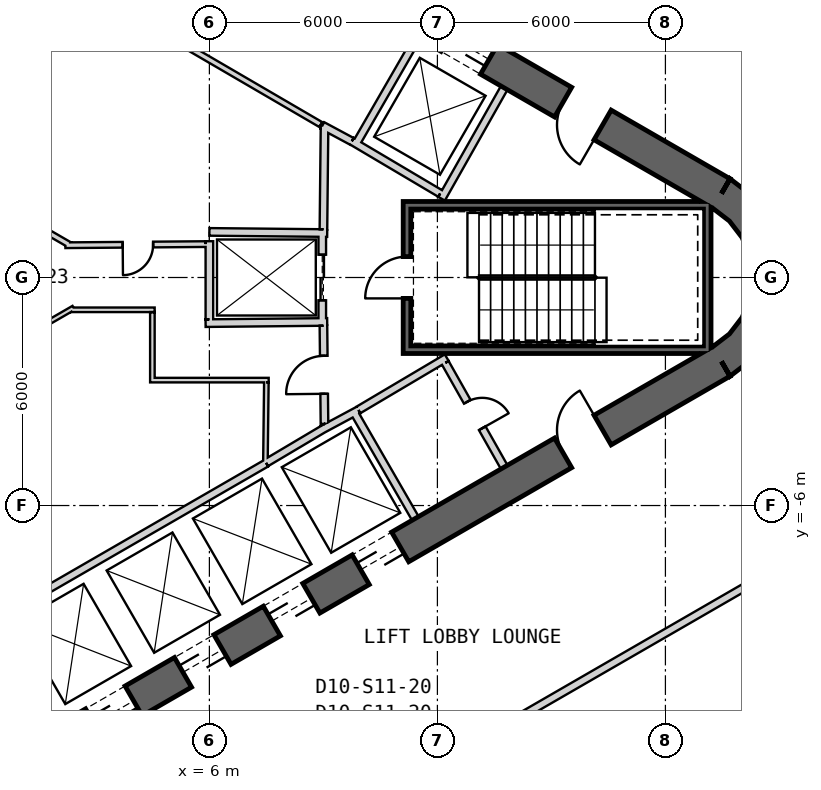
"""IFC4 building model, lengths in metres.
Left out: names, types, materials, properties, quantities, classifications, styles, units other than length and angle.
Written with IfcOpenShell. Run it as: python <this file> out.ifc"""

import sys

from ifc_helpers import new_model, si_unit, direction, frame, frame_2d, origin, place, context, subcontext, project, spatial, polyline, rectangle, outline, extrude, element, fill, save


model = new_model("IFC4")
c1 = context("Model", 3, precision=1e-05, world=origin(), true_north=direction((0.0, 1.0)))
c2 = subcontext(c1, "Body", "Model", "MODEL_VIEW")
j1 = project(units=[si_unit("LENGTHUNIT", "METRE"), si_unit("PLANEANGLEUNIT", "RADIAN")], contexts=[c1])
p1 = place(None, origin())
s1 = spatial("IfcSite", under=j1, at=p1, CompositionType="ELEMENT")
p2 = place(p1, origin())
s2 = spatial("IfcBuilding", under=s1, at=p2, CompositionType="ELEMENT")
p3 = place(p2, frame((0.0, 0.0, 193.2)))
s3 = spatial("IfcBuildingStorey", under=s2, at=p3, CompositionType="ELEMENT", Elevation=193.2)
p4 = place(p3, frame((19.475, 2.208, 0.0), z_axis=(0.0, 0.0, 1.0), x_axis=(-0.866028369851, 0.499994862586, 0.0)))
e1 = element("IfcWall", 1, at=p4, inside=s3, PredefinedType="SHEAR", context=c2, shape_type="SweptSolid", body=[
    extrude(rectangle(XDim=31.523, YDim=0.9, at=frame_2d((15.762, 0.0))), origin(), (0.0, 0.0, 1.0), 4.0),
])
p5 = place(p4, frame((7.062, 0.0, 0.0)))
e2 = element("IfcOpeningElement", 2, at=p5, cuts=e1, PredefinedType="OPENING", context=c2, shape_type="SweptSolid", body=[
    extrude(rectangle(XDim=1.2, YDim=2.4, at=frame_2d((0.6, 1.2))), frame((0.0, 0.46, 0.0), z_axis=(0.0, -1.0, 0.0), x_axis=(1.0, 0.0, 0.0)), (0.0, 0.0, 1.0), 0.92),
])
p6 = place(p4, frame((3.612, 0.0, 0.0)))
e3 = element("IfcOpeningElement", 3, at=p6, cuts=e1, PredefinedType="OPENING", context=c2, shape_type="SweptSolid", body=[
    extrude(rectangle(XDim=1.2, YDim=2.4, at=frame_2d((0.6, 1.2))), frame((0.0, 0.46, 0.0), z_axis=(0.0, -1.0, 0.0), x_axis=(1.0, 0.0, 0.0)), (0.0, 0.0, 1.0), 0.92),
])
p7 = place(p4, frame((26.712, 0.0, 0.0)))
e4 = element("IfcOpeningElement", 4, at=p7, cuts=e1, PredefinedType="OPENING", context=c2, shape_type="SweptSolid", body=[
    extrude(rectangle(XDim=1.2, YDim=2.4, at=frame_2d((0.6, 1.2))), frame((0.0, 0.46, 0.0), z_axis=(0.0, -1.0, 0.0), x_axis=(1.0, 0.0, 0.0)), (0.0, 0.0, 1.0), 0.92),
])
p8 = place(p3, frame((-7.825, -17.97, 0.0), z_axis=(0.0, 0.0, 1.0), x_axis=(0.866028369851, 0.499994862586, 0.0)))
e5 = element("IfcWall", 5, at=p8, inside=s3, PredefinedType="SHEAR", context=c2, shape_type="SweptSolid", body=[
    extrude(rectangle(XDim=31.523, YDim=0.9, at=frame_2d((15.762, 0.0))), origin(), (0.0, 0.0, 1.0), 4.0),
])
p9 = place(p8, frame((7.062, 0.0, 0.0)))
e6 = element("IfcOpeningElement", 6, at=p9, cuts=e5, PredefinedType="OPENING", context=c2, shape_type="SweptSolid", body=[
    extrude(rectangle(XDim=1.2, YDim=2.4, at=frame_2d((0.6, 1.2))), frame((0.0, 0.46, 0.0), z_axis=(0.0, -1.0, 0.0), x_axis=(1.0, 0.0, 0.0)), (0.0, 0.0, 1.0), 0.92),
])
p10 = place(p8, frame((9.762, 0.0, 0.0)))
e7 = element("IfcOpeningElement", 7, at=p10, cuts=e5, PredefinedType="OPENING", context=c2, shape_type="SweptSolid", body=[
    extrude(rectangle(XDim=1.2, YDim=2.4, at=frame_2d((0.6, 1.2))), frame((0.0, 0.46, 0.0), z_axis=(0.0, -1.0, 0.0), x_axis=(1.0, 0.0, 0.0)), (0.0, 0.0, 1.0), 0.92),
])
p11 = place(p8, frame((12.462, 0.0, 0.0)))
e8 = element("IfcOpeningElement", 8, at=p11, cuts=e5, PredefinedType="OPENING", context=c2, shape_type="SweptSolid", body=[
    extrude(rectangle(XDim=1.2, YDim=2.4, at=frame_2d((0.6, 1.2))), frame((0.0, 0.46, 0.0), z_axis=(0.0, -1.0, 0.0), x_axis=(1.0, 0.0, 0.0)), (0.0, 0.0, 1.0), 0.92),
])
p12 = place(p8, frame((15.162, 0.0, 0.0)))
e9 = element("IfcOpeningElement", 9, at=p12, cuts=e5, PredefinedType="OPENING", context=c2, shape_type="SweptSolid", body=[
    extrude(rectangle(XDim=1.2, YDim=2.4, at=frame_2d((0.6, 1.2))), frame((0.0, 0.46, 0.0), z_axis=(0.0, -1.0, 0.0), x_axis=(1.0, 0.0, 0.0)), (0.0, 0.0, 1.0), 0.92),
])
p13 = place(p8, frame((17.862, 0.0, 0.0)))
e10 = element("IfcOpeningElement", 10, at=p13, cuts=e5, PredefinedType="OPENING", context=c2, shape_type="SweptSolid", body=[
    extrude(rectangle(XDim=1.2, YDim=2.4, at=frame_2d((0.6, 1.2))), frame((0.0, 0.46, 0.0), z_axis=(0.0, -1.0, 0.0), x_axis=(1.0, 0.0, 0.0)), (0.0, 0.0, 1.0), 0.92),
])
p14 = place(p8, frame((20.562, 0.0, 0.0)))
e11 = element("IfcOpeningElement", 11, at=p14, cuts=e5, PredefinedType="OPENING", context=c2, shape_type="SweptSolid", body=[
    extrude(rectangle(XDim=1.2, YDim=2.4, at=frame_2d((0.6, 1.2))), frame((0.0, 0.46, 0.0), z_axis=(0.0, -1.0, 0.0), x_axis=(1.0, 0.0, 0.0)), (0.0, 0.0, 1.0), 0.92),
])
p15 = place(p8, frame((26.712, 0.0, 0.0)))
e12 = element("IfcOpeningElement", 12, at=p15, cuts=e5, PredefinedType="OPENING", context=c2, shape_type="SweptSolid", body=[
    extrude(rectangle(XDim=1.2, YDim=2.4, at=frame_2d((0.6, 1.2))), frame((0.0, 0.46, 0.0), z_axis=(0.0, -1.0, 0.0), x_axis=(1.0, 0.0, 0.0)), (0.0, 0.0, 1.0), 0.92),
])
p16 = place(p8, frame((3.612, 0.0, 0.0)))
e13 = element("IfcOpeningElement", 13, at=p16, cuts=e5, PredefinedType="OPENING", context=c2, shape_type="SweptSolid", body=[
    extrude(rectangle(XDim=1.2, YDim=2.4, at=frame_2d((0.6, 1.2))), frame((0.0, 0.46, 0.0), z_axis=(0.0, -1.0, 0.0), x_axis=(1.0, 0.0, 0.0)), (0.0, 0.0, 1.0), 0.92),
])
p17 = place(p3, origin())
e14 = element("IfcWall", 14, at=p17, inside=s3, PredefinedType="SHEAR", context=c2, shape_type="SweptSolid", body=[
    extrude(outline(polyline([(19.7, -2.598), (20.321, -2.121), (20.798, -1.5), (21.098, -0.777), (21.2, 0.0), (21.098, 0.777), (20.798, 1.5), (20.321, 2.121), (19.7, 2.598), (19.25, 1.819), (19.685, 1.485), (20.019, 1.05), (20.229, 0.543), (20.3, 0.0), (20.229, -0.543), (20.019, -1.05), (19.685, -1.485), (19.25, -1.819), (19.7, -2.598)])), origin(), (0.0, 0.0, 1.0), 4.0),
])
p18 = place(p3, frame((9.847, 3.495, 0.0), z_axis=(0.0, 0.0, 1.0), x_axis=(0.499984717929, 0.866034226713, 0.0)))
e15 = element("IfcWall", 15, at=p18, inside=s3, PredefinedType="PLUMBINGWALL", context=c2, shape_type="SweptSolid", body=[
    extrude(rectangle(XDim=3.25, YDim=0.2, at=frame_2d((1.625, 0.0))), origin(), (0.0, 0.0, 1.0), 3.7),
])
p19 = place(p3, frame((12.11, 2.073, 0.0), z_axis=(0.0, 0.0, 1.0), x_axis=(0.49196600604, 0.870614408852, 0.0)))
e16 = element("IfcWall", 16, at=p19, inside=s3, PredefinedType="PLUMBINGWALL", context=c2, shape_type="SweptSolid", body=[
    extrude(rectangle(XDim=3.35, YDim=0.2, at=frame_2d((1.675, 0.0))), origin(), (0.0, 0.0, 1.0), 3.7),
])
p20 = place(p3, frame((12.073, 2.211, 0.0), z_axis=(0.0, 0.0, 1.0), x_axis=(-0.860414880418, 0.509594185166, 0.0)))
e17 = element("IfcWall", 17, at=p20, inside=s3, PredefinedType="PLUMBINGWALL", context=c2, shape_type="SweptSolid", body=[
    extrude(rectangle(XDim=2.7, YDim=0.2, at=frame_2d((1.35, 0.0))), origin(), (0.0, 0.0, 1.0), 3.7),
])
p21 = place(p3, frame((0.483, -8.936, 0.0), z_axis=(0.0, 0.0, 1.0), x_axis=(0.866030989016, 0.499990325971, 0.0)))
e18 = element("IfcWall", 18, at=p21, inside=s3, PredefinedType="PLUMBINGWALL", context=c2, shape_type="SweptSolid", body=[
    extrude(rectangle(XDim=8.1, YDim=0.2, at=frame_2d((4.05, 0.0))), origin(), (0.0, 0.0, 1.0), 3.7),
])
p22 = place(p3, frame((9.795, -3.525, 0.0), z_axis=(0.0, 0.0, 1.0), x_axis=(0.499984717929, -0.866034226713, 0.0)))
e19 = element("IfcWall", 19, at=p22, inside=s3, PredefinedType="PLUMBINGWALL", context=c2, shape_type="SweptSolid", body=[
    extrude(rectangle(XDim=3.25, YDim=0.2, at=frame_2d((1.625, 0.0))), origin(), (0.0, 0.0, 1.0), 3.7),
])
p23 = place(p3, frame((8.974, -3.999, 0.0), z_axis=(0.0, 0.0, 1.0), x_axis=(0.880907015104, 0.473289373154, 0.0)))
e20 = element("IfcWall", 20, at=p23, inside=s3, PredefinedType="PLUMBINGWALL", context=c2, shape_type="SweptSolid", body=[
    extrude(rectangle(XDim=1.078, YDim=0.2, at=frame_2d((0.539, 0.0))), origin(), (0.0, 0.0, 1.0), 3.7),
])
p24 = place(p3, frame((7.493, -4.878, 0.0), z_axis=(0.0, 0.0, 1.0), x_axis=(0.859981807212, 0.510324691999, 0.0)))
e21 = element("IfcWall", 21, at=p24, inside=s3, PredefinedType="PLUMBINGWALL", context=c2, shape_type="SweptSolid", body=[
    extrude(rectangle(XDim=1.845, YDim=0.2, at=frame_2d((0.922, 0.0))), origin(), (0.0, 0.0, 1.0), 3.7),
])
p25 = place(p3, frame((19.2, 1.9, -0.3), z_axis=(0.0, 0.0, 1.0), x_axis=(-1.0, 0.0, 0.0)))
e22 = element("IfcWall", 22, at=p25, inside=s3, PredefinedType="SHEAR", context=c2, shape_type="SweptSolid", body=[
    extrude(rectangle(XDim=8.1, YDim=0.2, at=frame_2d((4.05, 0.0))), origin(), (0.0, 0.0, 1.0), 4.0),
])
p26 = place(p3, frame((19.1, -2.0, -0.3), z_axis=(0.0, 0.0, 1.0), x_axis=(0.0, 1.0, 0.0)))
e23 = element("IfcWall", 23, at=p26, inside=s3, PredefinedType="SHEAR", context=c2, shape_type="SweptSolid", body=[
    extrude(rectangle(XDim=3.8, YDim=0.2, at=frame_2d((1.9, 0.0))), origin(), (0.0, 0.0, 1.0), 4.0),
])
p27 = place(p3, frame((11.1, -1.9, -0.3), z_axis=(0.0, 0.0, 1.0), x_axis=(1.0, 0.0, 0.0)))
e24 = element("IfcWall", 24, at=p27, inside=s3, PredefinedType="SHEAR", context=c2, shape_type="SweptSolid", body=[
    extrude(rectangle(XDim=7.9, YDim=0.2, at=frame_2d((3.95, 0.0))), origin(), (0.0, 0.0, 1.0), 4.0),
])
p28 = place(p3, frame((11.2, -1.8, -0.3), z_axis=(0.0, 0.0, 1.0), x_axis=(0.0, 1.0, 0.0)))
e25 = element("IfcWall", 25, at=p28, inside=s3, PredefinedType="SHEAR", context=c2, shape_type="SweptSolid", body=[
    extrude(rectangle(XDim=3.6, YDim=0.2, at=frame_2d((1.8, 0.0))), origin(), (0.0, 0.0, 1.0), 4.0),
])
p29 = place(p28, frame((1.25, 0.0, 0.3)))
e26 = element("IfcOpeningElement", 26, at=p29, cuts=e25, PredefinedType="OPENING", context=c2, shape_type="SweptSolid", body=[
    extrude(rectangle(XDim=1.1, YDim=2.1, at=frame_2d((0.55, 1.05))), frame((0.0, 0.11, 0.0), z_axis=(0.0, -1.0, 0.0), x_axis=(1.0, 0.0, 0.0)), (0.0, 0.0, 1.0), 0.22),
])
p30 = place(p3, frame((8.97, 1.2, 0.0), z_axis=(0.0, 0.0, 1.0), x_axis=(0.0, -1.0, 0.0)))
e27 = element("IfcWall", 27, at=p30, inside=s3, PredefinedType="PLUMBINGWALL", context=c2, shape_type="SweptSolid", body=[
    extrude(rectangle(XDim=2.4, YDim=0.2, at=frame_2d((1.2, 0.0))), origin(), (0.0, 0.0, 1.0), 3.7),
])
p31 = place(p30, frame((0.6, 0.0, 0.0)))
e28 = element("IfcOpeningElement", 28, at=p31, cuts=e27, PredefinedType="OPENING", context=c2, shape_type="SweptSolid", body=[
    extrude(rectangle(XDim=1.2, YDim=2.4, at=frame_2d((0.6, 1.2))), frame((0.0, 0.11, 0.0), z_axis=(0.0, -1.0, 0.0), x_axis=(1.0, 0.0, 0.0)), (0.0, 0.0, 1.0), 0.22),
])
p32 = place(p3, frame((6.0, 1.2, 0.0), z_axis=(0.0, 0.0, 1.0), x_axis=(0.999949988, -0.010001074852, 0.0)))
e29 = element("IfcWall", 29, at=p32, inside=s3, PredefinedType="PLUMBINGWALL", context=c2, shape_type="SweptSolid", body=[
    extrude(rectangle(XDim=3.1, YDim=0.2, at=frame_2d((1.55, 0.0))), origin(), (0.0, 0.0, 1.0), 3.7),
])
p33 = place(p3, frame((5.9, -1.201, 0.0), z_axis=(0.0, 0.0, 1.0), x_axis=(0.999950064753, 0.009993397809, 0.0)))
e30 = element("IfcWall", 30, at=p33, inside=s3, PredefinedType="PLUMBINGWALL", context=c2, shape_type="SweptSolid", body=[
    extrude(rectangle(XDim=3.2, YDim=0.2, at=frame_2d((1.6, 0.0))), origin(), (0.0, 0.0, 1.0), 3.7),
])
p34 = place(p3, frame((6.0, -1.1, 0.0), z_axis=(0.0, 0.0, 1.0), x_axis=(0.0, 1.0, 0.0)))
e31 = element("IfcWall", 31, at=p34, inside=s3, PredefinedType="PLUMBINGWALL", context=c2, shape_type="SweptSolid", body=[
    extrude(rectangle(XDim=2.055, YDim=0.2, at=frame_2d((1.027, 0.0))), origin(), (0.0, 0.0, 1.0), 3.7),
])
p35 = place(p3, frame((8.974, 3.999, 0.0), z_axis=(0.0, 0.0, 1.0), x_axis=(0.880917147855, -0.473270513147, 0.0)))
e32 = element("IfcWall", 32, at=p35, inside=s3, PredefinedType="PARTITIONING", context=c2, shape_type="SweptSolid", body=[
    extrude(rectangle(XDim=0.878, YDim=0.2, at=frame_2d((0.439, 0.0))), origin(), (0.0, 0.0, 1.0), 3.7),
])
p36 = place(p3, frame((8.931, 4.024, 0.0), z_axis=(0.0, 0.0, 1.0), x_axis=(-0.863936620311, 0.50360055211, 0.0)))
e33 = element("IfcWall", 33, at=p36, inside=s3, PredefinedType="PLUMBINGWALL", context=c2, shape_type="SweptSolid", body=[
    extrude(rectangle(XDim=7.072, YDim=0.15, at=frame_2d((3.536, 0.0))), origin(), (0.0, 0.0, 1.0), 3.7),
])
p37 = place(p3, frame((12.245, -2.109, 0.0), z_axis=(0.0, 0.0, 1.0), x_axis=(-0.860414880418, -0.509594185166, 0.0)))
e34 = element("IfcWall", 34, at=p37, inside=s3, PredefinedType="PARTITIONING", context=c2, shape_type="SweptSolid", body=[
    extrude(rectangle(XDim=2.7, YDim=0.2, at=frame_2d((1.35, 0.0))), origin(), (0.0, 0.0, 1.0), 3.7),
])
p38 = place(p3, frame((13.758, -4.99, 0.0), z_axis=(0.0, 0.0, 1.0), x_axis=(-0.491993409184, 0.87059892334, 0.0)))
e35 = element("IfcWall", 35, at=p38, inside=s3, PredefinedType="PARTITIONING", context=c2, shape_type="SweptSolid", body=[
    extrude(rectangle(XDim=3.15, YDim=0.2, at=frame_2d((1.575, 0.0))), origin(), (0.0, 0.0, 1.0), 3.7),
])
p39 = place(p38, frame((1.175, 0.0, 0.0)))
e36 = element("IfcOpeningElement", 36, at=p39, cuts=e35, PredefinedType="OPENING", context=c2, shape_type="SweptSolid", body=[
    extrude(rectangle(XDim=0.8, YDim=2.1, at=frame_2d((0.4, 1.05))), frame((0.0, 0.11, 0.0), z_axis=(0.0, -1.0, 0.0), x_axis=(1.0, 0.0, 0.0)), (0.0, 0.0, 1.0), 0.22),
])
p40 = place(p3, frame((9.001, 1.27, 0.0), z_axis=(0.0, 0.0, 1.0), x_axis=(0.010747252091, 0.999942246619, 0.0)))
e37 = element("IfcWall", 37, at=p40, inside=s3, PredefinedType="PARTITIONING", context=c2, shape_type="SweptSolid", body=[
    extrude(rectangle(XDim=2.726, YDim=0.2, at=frame_2d((1.363, 0.0))), origin(), (0.0, 0.0, 1.0), 3.7),
])
p41 = place(p3, frame((9.029, -3.851, 0.0), z_axis=(0.0, 0.0, 1.0), x_axis=(-0.010783593937, 0.99994185536, 0.0)))
e38 = element("IfcWall", 38, at=p41, inside=s3, PredefinedType="PARTITIONING", context=c2, shape_type="SweptSolid", body=[
    extrude(rectangle(XDim=2.581, YDim=0.2, at=frame_2d((1.291, 0.0))), origin(), (0.0, 0.0, 1.0), 3.7),
])
p42 = place(p41, frame((0.791, 0.0, 0.0)))
e39 = element("IfcOpeningElement", 39, at=p42, cuts=e38, PredefinedType="OPENING", context=c2, shape_type="SweptSolid", body=[
    extrude(rectangle(XDim=1.0, YDim=2.1, at=frame_2d((0.5, 1.05))), frame((0.0, 0.11, 0.0), z_axis=(0.0, -1.0, 0.0), x_axis=(1.0, 0.0, 0.0)), (0.0, 0.0, 1.0), 0.22),
])
p43 = place(p3, frame((2.211, 0.849, 0.0), z_axis=(0.0, 0.0, 1.0), x_axis=(0.999967410175, 0.00807332566, 0.0)))
e40 = element("IfcWall", 40, at=p43, inside=s3, PredefinedType="PLUMBINGWALL", context=c2, shape_type="SweptSolid", body=[
    extrude(rectangle(XDim=3.689, YDim=0.15, at=frame_2d((1.845, 0.0))), origin(), (0.0, 0.0, 1.0), 3.7),
])
p44 = place(p43, frame((1.508, 0.0, 0.0)))
e41 = element("IfcOpeningElement", 41, at=p44, cuts=e40, PredefinedType="OPENING", context=c2, shape_type="SweptSolid", body=[
    extrude(rectangle(XDim=0.8, YDim=2.1, at=frame_2d((0.4, 1.05))), frame((0.0, 0.085, 0.0), z_axis=(0.0, -1.0, 0.0), x_axis=(1.0, 0.0, 0.0)), (0.0, 0.0, 1.0), 0.17),
])
p45 = place(p3, frame((-0.543, 2.514, 0.0), z_axis=(0.0, 0.0, 1.0), x_axis=(0.866042846705, -0.499969786758, 0.0)))
e42 = element("IfcWall", 42, at=p45, inside=s3, PredefinedType="PLUMBINGWALL", context=c2, shape_type="SweptSolid", body=[
    extrude(rectangle(XDim=3.304, YDim=0.15, at=frame_2d((1.652, 0.0))), origin(), (0.0, 0.0, 1.0), 3.7),
])
p46 = place(p3, frame((2.428, -0.798, 0.0), z_axis=(0.0, 0.0, 1.0), x_axis=(-0.866034586814, -0.499984094189, 0.0)))
e43 = element("IfcWall", 43, at=p46, inside=s3, PredefinedType="PARTITIONING", context=c2, shape_type="SweptSolid", body=[
    extrude(rectangle(XDim=3.285, YDim=0.12, at=frame_2d((1.642, 0.0))), origin(), (0.0, 0.0, 1.0), 3.7),
])
p47 = place(p3, frame((4.56, -0.85, 0.0), z_axis=(0.0, 0.0, 1.0), x_axis=(-1.0, 0.0, 0.0)))
e44 = element("IfcWall", 44, at=p47, inside=s3, PredefinedType="PARTITIONING", context=c2, shape_type="SweptSolid", body=[
    extrude(rectangle(XDim=2.203, YDim=0.12, at=frame_2d((1.102, 0.0))), origin(), (0.0, 0.0, 1.0), 3.7),
])
p48 = place(p3, frame((4.5, -2.76, 0.0), z_axis=(0.0, 0.0, 1.0), x_axis=(0.0, 1.0, 0.0)))
e45 = element("IfcWall", 45, at=p48, inside=s3, PredefinedType="PARTITIONING", context=c2, shape_type="SweptSolid", body=[
    extrude(rectangle(XDim=1.85, YDim=0.12, at=frame_2d((0.925, 0.0))), origin(), (0.0, 0.0, 1.0), 3.7),
])
p49 = place(p3, frame((7.56, -2.7, 0.0), z_axis=(0.0, 0.0, 1.0), x_axis=(-1.0, 0.0, 0.0)))
e46 = element("IfcWall", 46, at=p49, inside=s3, PredefinedType="PARTITIONING", context=c2, shape_type="SweptSolid", body=[
    extrude(rectangle(XDim=3.0, YDim=0.12, at=frame_2d((1.5, 0.0))), origin(), (0.0, 0.0, 1.0), 3.7),
])
p50 = place(p3, frame((7.475, -4.865, 0.0), z_axis=(0.0, 0.0, 1.0), x_axis=(0.011716133148, 0.999931363757, 0.0)))
e47 = element("IfcWall", 47, at=p50, inside=s3, PredefinedType="PARTITIONING", context=c2, shape_type="SweptSolid", body=[
    extrude(rectangle(XDim=2.105, YDim=0.12, at=frame_2d((1.052, 0.0))), origin(), (0.0, 0.0, 1.0), 3.7),
])
p51 = place(p3, frame((22.27, 5.386, 0.0), z_axis=(0.0, 0.0, 1.0), x_axis=(-0.866019551165, 0.500010136897, 0.0)))
e48 = element("IfcWall", 48, at=p51, inside=s3, PredefinedType="PARTITIONING", context=c2, shape_type="SweptSolid", body=[
    extrude(rectangle(XDim=12.243, YDim=0.2, at=frame_2d((6.122, 0.0))), origin(), (0.0, 0.0, 1.0), 2.88),
])
p52 = place(p3, frame((12.317, -12.634, 0.0), z_axis=(0.0, 0.0, 1.0), x_axis=(0.866028561818, 0.499994530085, 0.0)))
e49 = element("IfcWall", 49, at=p52, inside=s3, PredefinedType="PARTITIONING", context=c2, shape_type="SweptSolid", body=[
    extrude(rectangle(XDim=12.273, YDim=0.2, at=frame_2d((6.136, 0.0))), origin(), (0.0, 0.0, 1.0), 2.88),
])
p53 = place(p29, origin())
e50 = element("IfcDoor", 50, at=p53, inside=s3, OperationType="SINGLE_SWING_LEFT", PredefinedType="USERDEFINED", context=c2, shape_type="SweptSolid", body=[
    extrude(rectangle(XDim=1.1, YDim=2.1, at=frame_2d((0.55, 1.05))), frame((0.0, 0.025, 0.0), z_axis=(0.0, -1.0, 0.0), x_axis=(1.0, 0.0, 0.0)), (0.0, 0.0, 1.0), 0.05),
])
fill(e26, e50)
p54 = place(p42, origin())
e51 = element("IfcDoor", 51, at=p54, inside=s3, OperationType="SINGLE_SWING_RIGHT", PredefinedType="USERDEFINED", context=c2, shape_type="SweptSolid", body=[
    extrude(rectangle(XDim=1.0, YDim=2.1, at=frame_2d((0.5, 1.05))), frame((0.0, 0.025, 0.0), z_axis=(0.0, -1.0, 0.0), x_axis=(1.0, 0.0, 0.0)), (0.0, 0.0, 1.0), 0.05),
])
fill(e39, e51)
p55 = place(p31, origin())
e52 = element("IfcDoor", 52, at=p55, inside=s3, OperationType="SLIDING_TO_LEFT", PredefinedType="USERDEFINED", context=c2, shape_type="SweptSolid", body=[
    extrude(rectangle(XDim=1.2, YDim=2.4, at=frame_2d((0.6, 1.2))), frame((0.0, 0.025, 0.0), z_axis=(0.0, -1.0, 0.0), x_axis=(1.0, 0.0, 0.0)), (0.0, 0.0, 1.0), 0.05),
])
fill(e28, e52)
p56 = place(p44, origin())
e53 = element("IfcDoor", 53, at=p56, inside=s3, OperationType="SINGLE_SWING_LEFT", PredefinedType="USERDEFINED", context=c2, shape_type="SweptSolid", body=[
    extrude(rectangle(XDim=0.8, YDim=2.1, at=frame_2d((0.4, 1.05))), frame((0.0, 0.025, 0.0), z_axis=(0.0, -1.0, 0.0), x_axis=(1.0, 0.0, 0.0)), (0.0, 0.0, 1.0), 0.05),
])
fill(e41, e53)
p57 = place(p39, origin())
e54 = element("IfcDoor", 54, at=p57, inside=s3, OperationType="SINGLE_SWING_LEFT", PredefinedType="USERDEFINED", context=c2, shape_type="SweptSolid", body=[
    extrude(rectangle(XDim=0.8, YDim=2.1, at=frame_2d((0.4, 1.05))), frame((0.0, 0.025, 0.0), z_axis=(0.0, -1.0, 0.0), x_axis=(1.0, 0.0, 0.0)), (0.0, 0.0, 1.0), 0.05),
])
fill(e36, e54)
p58 = place(p5, origin())
e55 = element("IfcDoor", 55, at=p58, inside=s3, OperationType="SLIDING_TO_LEFT", PredefinedType="USERDEFINED", context=c2, shape_type="SweptSolid", body=[
    extrude(rectangle(XDim=1.2, YDim=2.4, at=frame_2d((0.6, 1.2))), frame((0.0, 0.025, 0.0), z_axis=(0.0, -1.0, 0.0), x_axis=(1.0, 0.0, 0.0)), (0.0, 0.0, 1.0), 0.05),
])
fill(e2, e55)
p59 = place(p11, origin())
e56 = element("IfcDoor", 56, at=p59, inside=s3, OperationType="SLIDING_TO_LEFT", PredefinedType="USERDEFINED", context=c2, shape_type="SweptSolid", body=[
    extrude(rectangle(XDim=1.2, YDim=2.4, at=frame_2d((0.6, 1.2))), frame((0.0, 0.025, 0.0), z_axis=(0.0, -1.0, 0.0), x_axis=(1.0, 0.0, 0.0)), (0.0, 0.0, 1.0), 0.05),
])
fill(e8, e56)
p60 = place(p12, origin())
e57 = element("IfcDoor", 57, at=p60, inside=s3, OperationType="SLIDING_TO_LEFT", PredefinedType="USERDEFINED", context=c2, shape_type="SweptSolid", body=[
    extrude(rectangle(XDim=1.2, YDim=2.4, at=frame_2d((0.6, 1.2))), frame((0.0, 0.025, 0.0), z_axis=(0.0, -1.0, 0.0), x_axis=(1.0, 0.0, 0.0)), (0.0, 0.0, 1.0), 0.05),
])
fill(e9, e57)
p61 = place(p13, origin())
e58 = element("IfcDoor", 58, at=p61, inside=s3, OperationType="SLIDING_TO_LEFT", PredefinedType="USERDEFINED", context=c2, shape_type="SweptSolid", body=[
    extrude(rectangle(XDim=1.2, YDim=2.4, at=frame_2d((0.6, 1.2))), frame((0.0, 0.025, 0.0), z_axis=(0.0, -1.0, 0.0), x_axis=(1.0, 0.0, 0.0)), (0.0, 0.0, 1.0), 0.05),
])
fill(e10, e58)
p62 = place(p14, origin())
e59 = element("IfcDoor", 59, at=p62, inside=s3, OperationType="SLIDING_TO_LEFT", PredefinedType="USERDEFINED", context=c2, shape_type="SweptSolid", body=[
    extrude(rectangle(XDim=1.2, YDim=2.4, at=frame_2d((0.6, 1.2))), frame((0.0, 0.025, 0.0), z_axis=(0.0, -1.0, 0.0), x_axis=(1.0, 0.0, 0.0)), (0.0, 0.0, 1.0), 0.05),
])
fill(e11, e59)
p63 = place(p15, origin())
e60 = element("IfcDoor", 60, at=p63, inside=s3, OperationType="SINGLE_SWING_RIGHT", PredefinedType="USERDEFINED", context=c2, shape_type="SweptSolid", body=[
    extrude(rectangle(XDim=1.2, YDim=2.4, at=frame_2d((0.6, 1.2))), frame((0.0, 0.025, 0.0), z_axis=(0.0, -1.0, 0.0), x_axis=(1.0, 0.0, 0.0)), (0.0, 0.0, 1.0), 0.05),
])
fill(e12, e60)
p64 = place(p6, origin())
e61 = element("IfcDoor", 61, at=p64, inside=s3, OperationType="SINGLE_SWING_RIGHT", PredefinedType="USERDEFINED", context=c2, shape_type="SweptSolid", body=[
    extrude(rectangle(XDim=1.2, YDim=2.4, at=frame_2d((0.6, 1.2))), frame((0.0, 0.025, 0.0), z_axis=(0.0, -1.0, 0.0), x_axis=(1.0, 0.0, 0.0)), (0.0, 0.0, 1.0), 0.05),
])
fill(e3, e61)
save(model, sys.argv[1])
